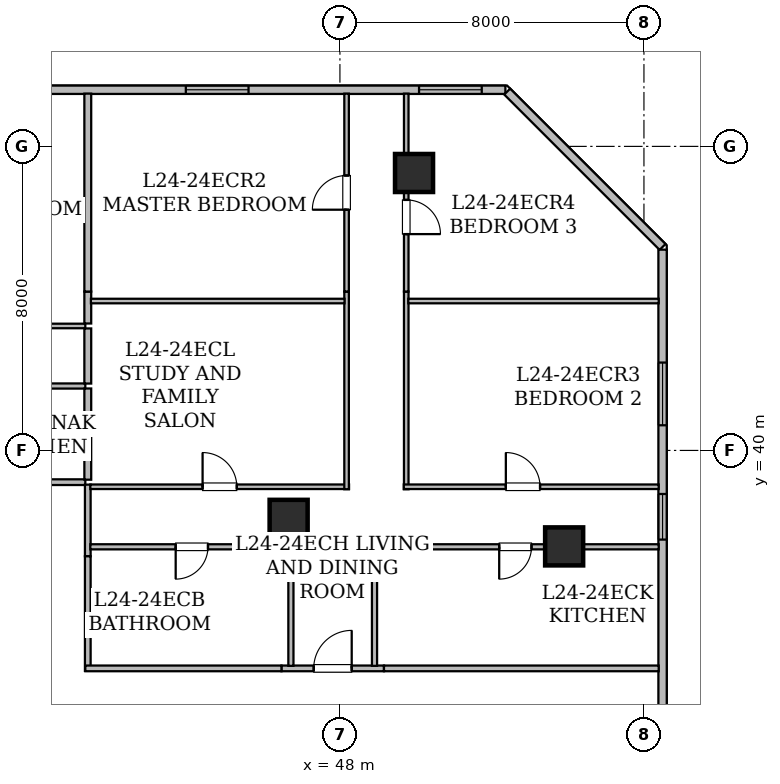
"""IFC4 building model, lengths in metres.
Left out: names, types, materials, properties, quantities, classifications, styles, units other than length and angle.
Written with IfcOpenShell. Run it as: python <this file> out.ifc"""

import sys

from ifc_helpers import new_model, si_unit, direction, frame, frame_2d, origin, origin_2d, place, context, subcontext, project, spatial, rectangle, hollow_rectangle, extrude, element, fill, save


model = new_model("IFC4")
c1 = context("Model", 3, precision=1e-05, world=origin(), true_north=direction((0.0, 1.0)))
c2 = subcontext(c1, "Body", "Model", "MODEL_VIEW")
j1 = project(units=[si_unit("LENGTHUNIT", "METRE"), si_unit("PLANEANGLEUNIT", "RADIAN")], contexts=[c1])
p1 = place(None, origin())
s1 = spatial("IfcSite", under=j1, at=p1, CompositionType="ELEMENT")
p2 = place(p1, origin())
s2 = spatial("IfcBuilding", under=s1, at=p2, CompositionType="ELEMENT")
p3 = place(p2, frame((0.0, 0.0, 98.25)))
s3 = spatial("IfcBuildingStorey", under=s2, at=p3, CompositionType="ELEMENT", Elevation=98.25)
for number, where, z_axis, x_axis in (
    (1, (49.95, 47.3, 0.0), (0.0, 0.0, 1.0), (1.0, 0.0, 0.0)),
    (2, (53.9, 37.475, 0.0), (0.0, 0.0, 1.0), (1.0, 0.0, 0.0)),
    (3, (46.65, 38.2, 0.0), (0.0, 0.0, 1.0), (1.0, 0.0, 0.0)),
):
    element("IfcColumn", number, at=place(p3, frame(where, z_axis=z_axis, x_axis=x_axis)), inside=s3, PredefinedType="COLUMN", context=c2, shape_type="SweptSolid", body=[
        extrude(hollow_rectangle(XDim=1.0, YDim=1.0, WallThickness=0.05, at=origin_2d()), origin(), (0.0, 0.0, 1.0), 3.65),
    ])
p4 = place(p3, frame((13.715, 49.49, 0.0), z_axis=(0.0, 0.0, 1.0), x_axis=(1.0, 0.0, 0.0)))
e4 = element("IfcWall", 4, at=p4, inside=s3, PredefinedType="STANDARD", context=c2, shape_type="SweptSolid", body=[
    extrude(rectangle(XDim=38.639, YDim=0.22, at=frame_2d((19.319, 0.0))), origin(), (0.0, 0.0, 1.0), 3.43),
])
p5 = place(p4, frame((1.435, 0.0, 0.85)))
e5 = element("IfcOpeningElement", 5, at=p5, cuts=e4, PredefinedType="OPENING", context=c2, shape_type="SweptSolid", body=[
    extrude(rectangle(XDim=1.65, YDim=1.55, at=frame_2d((0.825, 0.775))), frame((0.0, 0.12, 0.0), z_axis=(0.0, -1.0, 0.0), x_axis=(1.0, 0.0, 0.0)), (0.0, 0.0, 1.0), 0.24),
])
p6 = place(p4, frame((10.802, 0.0, 0.85)))
e6 = element("IfcOpeningElement", 6, at=p6, cuts=e4, PredefinedType="OPENING", context=c2, shape_type="SweptSolid", body=[
    extrude(rectangle(XDim=1.65, YDim=1.55, at=frame_2d((0.825, 0.775))), frame((0.0, 0.12, 0.0), z_axis=(0.0, -1.0, 0.0), x_axis=(1.0, 0.0, 0.0)), (0.0, 0.0, 1.0), 0.24),
])
p7 = place(p4, frame((8.744, 0.0, 0.8)))
e7 = element("IfcOpeningElement", 7, at=p7, cuts=e4, PredefinedType="OPENING", context=c2, shape_type="SweptSolid", body=[
    extrude(rectangle(XDim=1.2, YDim=1.5, at=frame_2d((0.6, 0.75))), frame((0.0, 0.12, 0.0), z_axis=(0.0, -1.0, 0.0), x_axis=(1.0, 0.0, 0.0)), (0.0, 0.0, 1.0), 0.24),
])
p8 = place(p4, frame((5.319, 0.0, 0.85)))
e8 = element("IfcOpeningElement", 8, at=p8, cuts=e4, PredefinedType="OPENING", context=c2, shape_type="SweptSolid", body=[
    extrude(rectangle(XDim=1.65, YDim=1.55, at=frame_2d((0.825, 0.775))), frame((0.0, 0.12, 0.0), z_axis=(0.0, -1.0, 0.0), x_axis=(1.0, 0.0, 0.0)), (0.0, 0.0, 1.0), 0.24),
])
p9 = place(p4, frame((15.556, 0.0, 0.85)))
e9 = element("IfcOpeningElement", 9, at=p9, cuts=e4, PredefinedType="OPENING", context=c2, shape_type="SweptSolid", body=[
    extrude(rectangle(XDim=1.65, YDim=1.55, at=frame_2d((0.825, 0.775))), frame((0.0, 0.12, 0.0), z_axis=(0.0, -1.0, 0.0), x_axis=(1.0, 0.0, 0.0)), (0.0, 0.0, 1.0), 0.24),
])
p10 = place(p4, frame((22.821, 0.0, 0.85)))
e10 = element("IfcOpeningElement", 10, at=p10, cuts=e4, PredefinedType="OPENING", context=c2, shape_type="SweptSolid", body=[
    extrude(rectangle(XDim=1.65, YDim=1.55, at=frame_2d((0.825, 0.775))), frame((0.0, 0.12, 0.0), z_axis=(0.0, -1.0, 0.0), x_axis=(1.0, 0.0, 0.0)), (0.0, 0.0, 1.0), 0.24),
])
p11 = place(p4, frame((30.23, 0.0, 0.85)))
e11 = element("IfcOpeningElement", 11, at=p11, cuts=e4, PredefinedType="OPENING", context=c2, shape_type="SweptSolid", body=[
    extrude(rectangle(XDim=1.65, YDim=1.55, at=frame_2d((0.825, 0.775))), frame((0.0, 0.12, 0.0), z_axis=(0.0, -1.0, 0.0), x_axis=(1.0, 0.0, 0.0)), (0.0, 0.0, 1.0), 0.24),
])
p12 = place(p4, frame((36.367, 0.0, 0.85)))
e12 = element("IfcOpeningElement", 12, at=p12, cuts=e4, PredefinedType="OPENING", context=c2, shape_type="SweptSolid", body=[
    extrude(rectangle(XDim=1.65, YDim=1.55, at=frame_2d((0.825, 0.775))), frame((0.0, 0.12, 0.0), z_axis=(0.0, -1.0, 0.0), x_axis=(1.0, 0.0, 0.0)), (0.0, 0.0, 1.0), 0.24),
])
p13 = place(p3, frame((52.402, 49.442, 0.0), z_axis=(0.0, 0.0, 1.0), x_axis=(0.707106781187, -0.707106781187, 0.0)))
e13 = element("IfcWall", 13, at=p13, inside=s3, PredefinedType="STANDARD", context=c2, shape_type="SweptSolid", body=[
    extrude(rectangle(XDim=5.781, YDim=0.22, at=frame_2d((2.891, 0.0))), origin(), (0.0, 0.0, 1.0), 3.43),
])
p14 = place(p3, frame((56.49, 45.283, 0.0), z_axis=(0.0, 0.0, 1.0), x_axis=(0.0, -1.0, 0.0)))
e14 = element("IfcWall", 14, at=p14, inside=s3, PredefinedType="STANDARD", context=c2, shape_type="SweptSolid", body=[
    extrude(rectangle(XDim=14.046, YDim=0.22, at=frame_2d((7.023, 0.0))), origin(), (0.0, 0.0, 1.0), 3.43),
])
p15 = place(p14, frame((6.429, 0.0, 0.8)))
e15 = element("IfcOpeningElement", 15, at=p15, cuts=e14, PredefinedType="OPENING", context=c2, shape_type="SweptSolid", body=[
    extrude(rectangle(XDim=1.2, YDim=1.5, at=frame_2d((0.6, 0.75))), frame((0.0, 0.12, 0.0), z_axis=(0.0, -1.0, 0.0), x_axis=(1.0, 0.0, 0.0)), (0.0, 0.0, 1.0), 0.24),
])
p16 = place(p14, frame((2.971, 0.0, 0.85)))
e16 = element("IfcOpeningElement", 16, at=p16, cuts=e14, PredefinedType="OPENING", context=c2, shape_type="SweptSolid", body=[
    extrude(rectangle(XDim=1.65, YDim=1.55, at=frame_2d((0.825, 0.775))), frame((0.0, 0.12, 0.0), z_axis=(0.0, -1.0, 0.0), x_axis=(1.0, 0.0, 0.0)), (0.0, 0.0, 1.0), 0.24),
])
p17 = place(p3, frame((34.299, 39.165, 0.0), z_axis=(0.0, 0.0, 1.0), x_axis=(1.0, 0.0, 0.0)))
e17 = element("IfcWall", 17, at=p17, inside=s3, PredefinedType="STANDARD", context=c2, shape_type="SweptSolid", body=[
    extrude(rectangle(XDim=7.001, YDim=0.15, at=frame_2d((3.5, 0.0))), origin(), (0.0, 0.0, 1.0), 2.647),
])
p18 = place(p3, frame((41.365, 39.1, 0.0), z_axis=(0.0, 0.0, 1.0), x_axis=(0.0, -1.0, 0.0)))
e18 = element("IfcWall", 18, at=p18, inside=s3, PredefinedType="STANDARD", context=c2, shape_type="SweptSolid", body=[
    extrude(rectangle(XDim=1.885, YDim=0.15, at=frame_2d((0.942, 0.0))), origin(), (0.0, 0.0, 1.0), 2.647),
])
p19 = place(p3, frame((46.461, 34.265, 0.0), z_axis=(0.0, 0.0, 1.0), x_axis=(1.0, 0.0, 0.0)))
e19 = element("IfcWall", 19, at=p19, inside=s3, PredefinedType="STANDARD", context=c2, shape_type="SweptSolid", body=[
    extrude(rectangle(XDim=2.698, YDim=0.15, at=frame_2d((1.349, 0.0))), origin(), (0.0, 0.0, 1.0), 2.647),
])
p20 = place(p19, frame((0.849, 0.0, 0.0)))
e20 = element("IfcOpeningElement", 20, at=p20, cuts=e19, PredefinedType="OPENING", context=c2, shape_type="SweptSolid", body=[
    extrude(rectangle(XDim=1.0, YDim=2.15, at=frame_2d((0.5, 1.075))), frame((0.0, 0.085, 0.0), z_axis=(0.0, -1.0, 0.0), x_axis=(1.0, 0.0, 0.0)), (0.0, 0.0, 1.0), 0.17),
])
p21 = place(p3, frame((41.365, 37.215, 0.0), z_axis=(0.0, 0.0, 1.0), x_axis=(0.0, -1.0, 0.0)))
e21 = element("IfcWall", 21, at=p21, inside=s3, PredefinedType="STANDARD", context=c2, shape_type="SweptSolid", body=[
    extrude(rectangle(XDim=3.015, YDim=0.15, at=frame_2d((1.508, 0.0))), origin(), (0.0, 0.0, 1.0), 2.647),
])
p22 = place(p3, frame((41.3, 34.265, 0.0), z_axis=(0.0, 0.0, 1.0), x_axis=(1.0, 0.0, 0.0)))
e22 = element("IfcWall", 22, at=p22, inside=s3, PredefinedType="STANDARD", context=c2, shape_type="SweptSolid", body=[
    extrude(rectangle(XDim=5.161, YDim=0.15, at=frame_2d((2.581, 0.0))), origin(), (0.0, 0.0, 1.0), 2.647),
])
p23 = place(p3, frame((49.159, 34.265, 0.0), z_axis=(0.0, 0.0, 1.0), x_axis=(1.0, 0.0, 0.0)))
e23 = element("IfcWall", 23, at=p23, inside=s3, PredefinedType="STANDARD", context=c2, shape_type="SweptSolid", body=[
    extrude(rectangle(XDim=7.229, YDim=0.15, at=frame_2d((3.615, 0.0))), origin(), (0.0, 0.0, 1.0), 2.876),
])
p24 = place(p3, frame((41.3, 41.695, 0.0), z_axis=(0.0, 0.0, 1.0), x_axis=(-1.0, 0.0, 0.0)))
e24 = element("IfcWall", 24, at=p24, inside=s3, PredefinedType="PARTITIONING", context=c2, shape_type="SweptSolid", body=[
    extrude(rectangle(XDim=7.315, YDim=0.135, at=frame_2d((3.657, 0.0))), origin(), (0.0, 0.0, 1.0), 2.647),
])
p25 = place(p24, frame((3.233, 0.0, 0.0)))
e25 = element("IfcOpeningElement", 25, at=p25, cuts=e24, PredefinedType="OPENING", context=c2, shape_type="SweptSolid", body=[
    extrude(rectangle(XDim=0.85, YDim=2.1, at=frame_2d((0.425, 1.05))), frame((0.0, 0.077, 0.0), z_axis=(0.0, -1.0, 0.0), x_axis=(1.0, 0.0, 0.0)), (0.0, 0.0, 1.0), 0.155),
])
p26 = place(p3, frame((33.607, 43.275, 0.0), z_axis=(0.0, 0.0, 1.0), x_axis=(1.0, 0.0, 0.0)))
e26 = element("IfcWall", 26, at=p26, inside=s3, PredefinedType="PARTITIONING", context=c2, shape_type="SweptSolid", body=[
    extrude(rectangle(XDim=7.693, YDim=0.12, at=frame_2d((3.847, 0.0))), origin(), (0.0, 0.0, 1.0), 2.647),
])
p27 = place(p26, frame((3.396, 0.0, 0.0)))
e27 = element("IfcOpeningElement", 27, at=p27, cuts=e26, PredefinedType="OPENING", context=c2, shape_type="SweptSolid", body=[
    extrude(rectangle(XDim=0.9, YDim=2.1, at=frame_2d((0.45, 1.05))), frame((0.0, 0.07, 0.0), z_axis=(0.0, -1.0, 0.0), x_axis=(1.0, 0.0, 0.0)), (0.0, 0.0, 1.0), 0.14),
])
p28 = place(p3, frame((41.365, 43.21, 0.0), z_axis=(0.0, 0.0, 1.0), x_axis=(0.0, -1.0, 0.0)))
e28 = element("IfcWall", 28, at=p28, inside=s3, PredefinedType="STANDARD", context=c2, shape_type="SweptSolid", body=[
    extrude(rectangle(XDim=1.45, YDim=0.18, at=frame_2d((0.725, 0.0))), origin(), (0.0, 0.0, 1.0), 3.43),
])
p29 = place(p3, frame((41.365, 41.63, 0.0), z_axis=(0.0, 0.0, 1.0), x_axis=(0.0, -1.0, 0.0)))
e29 = element("IfcWall", 29, at=p29, inside=s3, PredefinedType="STANDARD", context=c2, shape_type="SweptSolid", body=[
    extrude(rectangle(XDim=2.4, YDim=0.18, at=frame_2d((1.2, 0.0))), origin(), (0.0, 0.0, 1.0), 3.43),
])
p30 = place(p3, frame((41.365, 44.18, 0.0), z_axis=(0.0, 0.0, 1.0), x_axis=(0.0, -1.0, 0.0)))
e30 = element("IfcWall", 30, at=p30, inside=s3, PredefinedType="STANDARD", context=c2, shape_type="SweptSolid", body=[
    extrude(rectangle(XDim=0.84, YDim=0.18, at=frame_2d((0.42, 0.0))), origin(), (0.0, 0.0, 1.0), 3.43),
])
p31 = place(p3, frame((41.365, 49.388, 0.0), z_axis=(0.0, 0.0, 1.0), x_axis=(0.0, -1.0, 0.0)))
e31 = element("IfcWall", 31, at=p31, inside=s3, PredefinedType="STANDARD", context=c2, shape_type="SweptSolid", body=[
    extrude(rectangle(XDim=5.208, YDim=0.18, at=frame_2d((2.604, 0.0))), origin(), (0.0, 0.0, 1.0), 2.876),
])
p32 = place(p3, frame((46.71, 34.332, 0.0), z_axis=(0.0, 0.0, 1.0), x_axis=(0.0, 1.0, 0.0)))
e32 = element("IfcWall", 32, at=p32, inside=s3, PredefinedType="PARTITIONING", context=c2, shape_type="SweptSolid", body=[
    extrude(rectangle(XDim=3.197, YDim=0.135, at=frame_2d((1.599, 0.0))), origin(), (0.0, 0.0, 1.0), 2.647),
])
p33 = place(p3, frame((46.775, 37.464, 0.0), z_axis=(0.0, 0.0, 1.0), x_axis=(-1.0, 0.0, 0.0)))
e33 = element("IfcWall", 33, at=p33, inside=s3, PredefinedType="PARTITIONING", context=c2, shape_type="SweptSolid", body=[
    extrude(rectangle(XDim=5.343, YDim=0.135, at=frame_2d((2.671, 0.0))), origin(), (0.0, 0.0, 1.0), 2.647),
])
p34 = place(p33, frame((2.247, 0.0, 0.0)))
e34 = element("IfcOpeningElement", 34, at=p34, cuts=e33, PredefinedType="OPENING", context=c2, shape_type="SweptSolid", body=[
    extrude(rectangle(XDim=0.85, YDim=2.1, at=frame_2d((0.425, 1.05))), frame((0.0, 0.077, 0.0), z_axis=(0.0, -1.0, 0.0), x_axis=(1.0, 0.0, 0.0)), (0.0, 0.0, 1.0), 0.155),
])
p35 = place(p3, frame((56.388, 37.464, 0.0), z_axis=(0.0, 0.0, 1.0), x_axis=(-1.0, 0.0, 0.0)))
e35 = element("IfcWall", 35, at=p35, inside=s3, PredefinedType="PARTITIONING", context=c2, shape_type="SweptSolid", body=[
    extrude(rectangle(XDim=7.543, YDim=0.135, at=frame_2d((3.771, 0.0))), origin(), (0.0, 0.0, 1.0), 2.647),
])
p36 = place(p35, frame((3.347, 0.0, 0.0)))
e36 = element("IfcOpeningElement", 36, at=p36, cuts=e35, PredefinedType="OPENING", context=c2, shape_type="SweptSolid", body=[
    extrude(rectangle(XDim=0.85, YDim=2.1, at=frame_2d((0.425, 1.05))), frame((0.0, 0.077, 0.0), z_axis=(0.0, -1.0, 0.0), x_axis=(1.0, 0.0, 0.0)), (0.0, 0.0, 1.0), 0.155),
])
p37 = place(p3, frame((48.91, 37.529, 0.0), z_axis=(0.0, 0.0, 1.0), x_axis=(0.0, -1.0, 0.0)))
e37 = element("IfcWall", 37, at=p37, inside=s3, PredefinedType="PARTITIONING", context=c2, shape_type="SweptSolid", body=[
    extrude(rectangle(XDim=3.197, YDim=0.135, at=frame_2d((1.599, 0.0))), origin(), (0.0, 0.0, 1.0), 3.43),
])
p38 = place(p3, frame((41.432, 39.044, 0.0), z_axis=(0.0, 0.0, 1.0), x_axis=(1.0, 0.0, 0.0)))
e38 = element("IfcWall", 38, at=p38, inside=s3, PredefinedType="PARTITIONING", context=c2, shape_type="SweptSolid", body=[
    extrude(rectangle(XDim=6.808, YDim=0.12, at=frame_2d((3.404, 0.0))), origin(), (0.0, 0.0, 1.0), 2.647),
])
p39 = place(p38, frame((2.954, 0.0, 0.0)))
e39 = element("IfcOpeningElement", 39, at=p39, cuts=e38, PredefinedType="OPENING", context=c2, shape_type="SweptSolid", body=[
    extrude(rectangle(XDim=0.9, YDim=2.1, at=frame_2d((0.45, 1.05))), frame((0.0, 0.07, 0.0), z_axis=(0.0, -1.0, 0.0), x_axis=(1.0, 0.0, 0.0)), (0.0, 0.0, 1.0), 0.14),
])
p40 = place(p3, frame((48.175, 38.979, 0.0), z_axis=(0.0, 0.0, 1.0), x_axis=(0.0, 1.0, 0.0)))
e40 = element("IfcWall", 40, at=p40, inside=s3, PredefinedType="PARTITIONING", context=c2, shape_type="SweptSolid", body=[
    extrude(rectangle(XDim=5.201, YDim=0.12, at=frame_2d((2.601, 0.0))), origin(), (0.0, 0.0, 1.0), 2.647),
])
p41 = place(p3, frame((48.175, 44.18, 0.0), z_axis=(0.0, 0.0, 1.0), x_axis=(0.0, 1.0, 0.0)))
e41 = element("IfcWall", 41, at=p41, inside=s3, PredefinedType="PARTITIONING", context=c2, shape_type="SweptSolid", body=[
    extrude(rectangle(XDim=5.208, YDim=0.12, at=frame_2d((2.604, 0.0))), origin(), (0.0, 0.0, 1.0), 2.876),
])
p42 = place(p41, frame((2.154, 0.0, 0.0)))
e42 = element("IfcOpeningElement", 42, at=p42, cuts=e41, PredefinedType="OPENING", context=c2, shape_type="SweptSolid", body=[
    extrude(rectangle(XDim=0.9, YDim=2.1, at=frame_2d((0.45, 1.05))), frame((0.0, 0.07, 0.0), z_axis=(0.0, -1.0, 0.0), x_axis=(1.0, 0.0, 0.0)), (0.0, 0.0, 1.0), 0.14),
])
p43 = place(p3, frame((49.745, 44.18, 0.0), z_axis=(0.0, 0.0, 1.0), x_axis=(0.0, -1.0, 0.0)))
e43 = element("IfcWall", 43, at=p43, inside=s3, PredefinedType="PARTITIONING", context=c2, shape_type="SweptSolid", body=[
    extrude(rectangle(XDim=5.201, YDim=0.12, at=frame_2d((2.601, 0.0))), origin(), (0.0, 0.0, 1.0), 3.43),
])
p44 = place(p3, frame((49.68, 39.044, 0.0), z_axis=(0.0, 0.0, 1.0), x_axis=(1.0, 0.0, 0.0)))
e44 = element("IfcWall", 44, at=p44, inside=s3, PredefinedType="PARTITIONING", context=c2, shape_type="SweptSolid", body=[
    extrude(rectangle(XDim=6.708, YDim=0.12, at=frame_2d((3.354, 0.0))), origin(), (0.0, 0.0, 1.0), 2.876),
])
p45 = place(p44, frame((2.686, 0.0, 0.0)))
e45 = element("IfcOpeningElement", 45, at=p45, cuts=e44, PredefinedType="OPENING", context=c2, shape_type="SweptSolid", body=[
    extrude(rectangle(XDim=0.9, YDim=2.1, at=frame_2d((0.45, 1.05))), frame((0.0, 0.07, 0.0), z_axis=(0.0, -1.0, 0.0), x_axis=(1.0, 0.0, 0.0)), (0.0, 0.0, 1.0), 0.14),
])
p46 = place(p3, frame((49.745, 49.388, 0.0), z_axis=(0.0, 0.0, 1.0), x_axis=(0.0, -1.0, 0.0)))
e46 = element("IfcWall", 46, at=p46, inside=s3, PredefinedType="PARTITIONING", context=c2, shape_type="SweptSolid", body=[
    extrude(rectangle(XDim=5.208, YDim=0.12, at=frame_2d((2.604, 0.0))), origin(), (0.0, 0.0, 1.0), 2.647),
])
p47 = place(p46, frame((2.796, 0.0, 0.0)))
e47 = element("IfcOpeningElement", 47, at=p47, cuts=e46, PredefinedType="OPENING", context=c2, shape_type="SweptSolid", body=[
    extrude(rectangle(XDim=0.9, YDim=2.1, at=frame_2d((0.45, 1.05))), frame((0.0, 0.07, 0.0), z_axis=(0.0, -1.0, 0.0), x_axis=(1.0, 0.0, 0.0)), (0.0, 0.0, 1.0), 0.14),
])
p48 = place(p3, frame((41.447, 43.931, 0.0), z_axis=(0.0, 0.0, 1.0), x_axis=(1.0, 0.0, 0.0)))
e48 = element("IfcWall", 48, at=p48, inside=s3, PredefinedType="PARTITIONING", context=c2, shape_type="SweptSolid", body=[
    extrude(rectangle(XDim=6.674, YDim=0.12, at=frame_2d((3.337, 0.0))), origin(), (0.0, 0.0, 1.0), 3.43),
])
p49 = place(p3, frame((49.799, 43.931, 0.0), z_axis=(0.0, 0.0, 1.0), x_axis=(1.0, 0.0, 0.0)))
e49 = element("IfcWall", 49, at=p49, inside=s3, PredefinedType="PARTITIONING", context=c2, shape_type="SweptSolid", body=[
    extrude(rectangle(XDim=6.589, YDim=0.12, at=frame_2d((3.294, 0.0))), origin(), (0.0, 0.0, 1.0), 2.876),
])
p50 = place(p15, origin())
e50 = element("IfcWindow", 50, at=p50, inside=s3, PartitioningType="SINGLE_PANEL", PredefinedType="WINDOW", context=c2, shape_type="SweptSolid", body=[
    extrude(rectangle(XDim=1.2, YDim=1.5, at=frame_2d((0.6, 0.75))), frame((0.0, 0.03, 0.0), z_axis=(0.0, -1.0, 0.0), x_axis=(1.0, 0.0, 0.0)), (0.0, 0.0, 1.0), 0.06),
])
fill(e15, e50)
p51 = place(p11, origin())
e51 = element("IfcWindow", 51, at=p51, inside=s3, PartitioningType="SINGLE_PANEL", PredefinedType="WINDOW", context=c2, shape_type="SweptSolid", body=[
    extrude(rectangle(XDim=1.65, YDim=1.55, at=frame_2d((0.825, 0.775))), frame((0.0, 0.03, 0.0), z_axis=(0.0, -1.0, 0.0), x_axis=(1.0, 0.0, 0.0)), (0.0, 0.0, 1.0), 0.06),
])
fill(e11, e51)
p52 = place(p16, origin())
e52 = element("IfcWindow", 52, at=p52, inside=s3, PartitioningType="SINGLE_PANEL", PredefinedType="WINDOW", context=c2, shape_type="SweptSolid", body=[
    extrude(rectangle(XDim=1.65, YDim=1.55, at=frame_2d((0.825, 0.775))), frame((0.0, 0.03, 0.0), z_axis=(0.0, -1.0, 0.0), x_axis=(1.0, 0.0, 0.0)), (0.0, 0.0, 1.0), 0.06),
])
fill(e16, e52)
p53 = place(p12, origin())
e53 = element("IfcWindow", 53, at=p53, inside=s3, PartitioningType="SINGLE_PANEL", PredefinedType="WINDOW", context=c2, shape_type="SweptSolid", body=[
    extrude(rectangle(XDim=1.65, YDim=1.55, at=frame_2d((0.825, 0.775))), frame((0.0, 0.03, 0.0), z_axis=(0.0, -1.0, 0.0), x_axis=(1.0, 0.0, 0.0)), (0.0, 0.0, 1.0), 0.06),
])
fill(e12, e53)
p54 = place(p20, origin())
e54 = element("IfcDoor", 54, at=p54, inside=s3, OperationType="SINGLE_SWING_RIGHT", PredefinedType="DOOR", context=c2, shape_type="SweptSolid", body=[
    extrude(rectangle(XDim=1.0, YDim=2.15, at=frame_2d((0.5, 1.075))), frame((0.0, 0.025, 0.0), z_axis=(0.0, -1.0, 0.0), x_axis=(1.0, 0.0, 0.0)), (0.0, 0.0, 1.0), 0.05),
])
fill(e20, e54)
p55 = place(p34, origin())
e55 = element("IfcDoor", 55, at=p55, inside=s3, OperationType="SINGLE_SWING_RIGHT", PredefinedType="DOOR", context=c2, shape_type="SweptSolid", body=[
    extrude(rectangle(XDim=0.85, YDim=2.1, at=frame_2d((0.425, 1.05))), frame((0.0, 0.025, 0.0), z_axis=(0.0, -1.0, 0.0), x_axis=(1.0, 0.0, 0.0)), (0.0, 0.0, 1.0), 0.05),
])
fill(e34, e55)
p56 = place(p36, origin())
e56 = element("IfcDoor", 56, at=p56, inside=s3, OperationType="SINGLE_SWING_RIGHT", PredefinedType="DOOR", context=c2, shape_type="SweptSolid", body=[
    extrude(rectangle(XDim=0.85, YDim=2.1, at=frame_2d((0.425, 1.05))), frame((0.0, 0.025, 0.0), z_axis=(0.0, -1.0, 0.0), x_axis=(1.0, 0.0, 0.0)), (0.0, 0.0, 1.0), 0.05),
])
fill(e36, e56)
p57 = place(p39, origin())
e57 = element("IfcDoor", 57, at=p57, inside=s3, OperationType="SINGLE_SWING_LEFT", PredefinedType="DOOR", context=c2, shape_type="SweptSolid", body=[
    extrude(rectangle(XDim=0.9, YDim=2.1, at=frame_2d((0.45, 1.05))), frame((0.0, 0.025, 0.0), z_axis=(0.0, -1.0, 0.0), x_axis=(1.0, 0.0, 0.0)), (0.0, 0.0, 1.0), 0.05),
])
fill(e39, e57)
p58 = place(p42, origin())
e58 = element("IfcDoor", 58, at=p58, inside=s3, OperationType="SINGLE_SWING_LEFT", PredefinedType="DOOR", context=c2, shape_type="SweptSolid", body=[
    extrude(rectangle(XDim=0.9, YDim=2.1, at=frame_2d((0.45, 1.05))), frame((0.0, 0.025, 0.0), z_axis=(0.0, -1.0, 0.0), x_axis=(1.0, 0.0, 0.0)), (0.0, 0.0, 1.0), 0.05),
])
fill(e42, e58)
p59 = place(p45, origin())
e59 = element("IfcDoor", 59, at=p59, inside=s3, OperationType="SINGLE_SWING_LEFT", PredefinedType="DOOR", context=c2, shape_type="SweptSolid", body=[
    extrude(rectangle(XDim=0.9, YDim=2.1, at=frame_2d((0.45, 1.05))), frame((0.0, 0.025, 0.0), z_axis=(0.0, -1.0, 0.0), x_axis=(1.0, 0.0, 0.0)), (0.0, 0.0, 1.0), 0.05),
])
fill(e45, e59)
p60 = place(p47, origin())
e60 = element("IfcDoor", 60, at=p60, inside=s3, OperationType="SINGLE_SWING_RIGHT", PredefinedType="DOOR", context=c2, shape_type="SweptSolid", body=[
    extrude(rectangle(XDim=0.9, YDim=2.1, at=frame_2d((0.45, 1.05))), frame((0.0, 0.025, 0.0), z_axis=(0.0, -1.0, 0.0), x_axis=(1.0, 0.0, 0.0)), (0.0, 0.0, 1.0), 0.05),
])
fill(e47, e60)
save(model, sys.argv[1])
